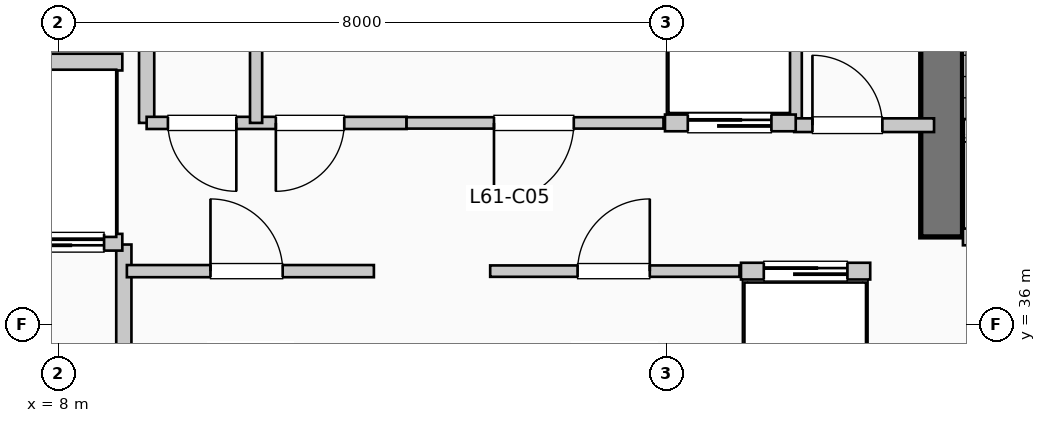
"""IFC4 building model, lengths in metres.
Left out: names, types, materials, properties, quantities, classifications, styles, units other than length and angle.
Written with IfcOpenShell. Run it as: python <this file> out.ifc"""

import sys

from ifc_helpers import new_model, si_unit, direction, frame, frame_2d, origin, place, context, subcontext, project, spatial, rectangle, extrude, element, fill, save


model = new_model("IFC4")
c1 = context("Model", 3, precision=1e-05, world=origin(), true_north=direction((0.0, 1.0)))
c2 = subcontext(c1, "Body", "Model", "MODEL_VIEW")
j1 = project(units=[si_unit("LENGTHUNIT", "METRE"), si_unit("PLANEANGLEUNIT", "RADIAN")], contexts=[c1])
p1 = place(None, origin())
s1 = spatial("IfcSite", under=j1, at=p1, CompositionType="ELEMENT")
p2 = place(p1, origin())
s2 = spatial("IfcBuilding", under=s1, at=p2, CompositionType="ELEMENT")
p3 = place(p2, frame((0.0, 0.0, 251.46)))
s3 = spatial("IfcBuildingStorey", under=s2, at=p3, CompositionType="ELEMENT", Elevation=251.46)
p4 = place(p3, frame((19.62, 37.15, 0.0), z_axis=(0.0, 0.0, 1.0), x_axis=(0.0, 1.0, 0.0)))
e1 = element("IfcWall", 1, at=p4, inside=s3, PredefinedType="SHEAR", context=c2, shape_type="SweptSolid", body=[
    extrude(rectangle(XDim=7.89, YDim=0.55, at=frame_2d((3.945, 0.0))), origin(), (0.0, 0.0, 1.0), 4.95),
])
p5 = place(p3, frame((8.86, 34.55, 0.0), z_axis=(0.0, 0.0, 1.0), x_axis=(0.0, 1.0, 0.0)))
e2 = element("IfcWall", 2, at=p5, inside=s3, PredefinedType="PARTITIONING", context=c2, shape_type="SweptSolid", body=[
    extrude(rectangle(XDim=2.5, YDim=0.2, at=frame_2d((1.25, 0.0))), origin(), (0.0, 0.0, 1.0), 4.7),
])
p6 = place(p3, frame((19.9, 37.15, 0.0), z_axis=(0.0, 0.0, 1.0), x_axis=(1.0, 0.0, 0.0)))
e3 = element("IfcWall", 3, at=p6, inside=s3, PredefinedType="PARTITIONING", context=c2, shape_type="SweptSolid", body=[
    extrude(rectangle(XDim=3.15, YDim=0.22, at=frame_2d((1.575, 0.0))), origin(), (0.0, 0.0, 1.0), 4.7),
])
p7 = place(p6, frame((2.05, 0.0, 0.0), z_axis=(0.0, 0.0, 1.0), x_axis=(-1.0, 0.0, 0.0)))
e4 = element("IfcOpeningElement", 4, at=p7, cuts=e3, PredefinedType="OPENING", context=c2, shape_type="SweptSolid", body=[
    extrude(rectangle(XDim=1.05, YDim=2.15, at=frame_2d((0.525, 1.075))), frame((0.0, 0.12, 0.0), z_axis=(0.0, -1.0, 0.0), x_axis=(1.0, 0.0, 0.0)), (0.0, 0.0, 1.0), 0.24),
])
p8 = place(p3, frame((5.38, 37.08, 0.0), z_axis=(0.0, 0.0, 1.0), x_axis=(1.0, 0.0, 0.0)))
e5 = element("IfcWall", 5, at=p8, inside=s3, PredefinedType="PARTITIONING", context=c2, shape_type="SweptSolid", body=[
    extrude(rectangle(XDim=3.46, YDim=0.22, at=frame_2d((1.73, 0.0))), origin(), (0.0, 0.0, 1.0), 4.7),
])
p9 = place(p8, frame((1.55, 0.0, 0.0), z_axis=(0.0, 0.0, 1.0), x_axis=(-1.0, 0.0, 0.0)))
e6 = element("IfcOpeningElement", 6, at=p9, cuts=e5, PredefinedType="OPENING", context=c2, shape_type="SweptSolid", body=[
    extrude(rectangle(XDim=1.2, YDim=2.2, at=frame_2d((0.6, 1.1))), frame((0.0, 0.12, 0.0), z_axis=(0.0, -1.0, 0.0), x_axis=(1.0, 0.0, 0.0)), (0.0, 0.0, 1.0), 0.24),
])
p10 = place(p8, frame((3.22, 0.0, 0.0), z_axis=(0.0, 0.0, 1.0), x_axis=(-1.0, 0.0, 0.0)))
e7 = element("IfcOpeningElement", 7, at=p10, cuts=e5, PredefinedType="OPENING", context=c2, shape_type="SweptSolid", body=[
    extrude(rectangle(XDim=1.2, YDim=2.2, at=frame_2d((0.6, 1.1))), frame((0.0, 0.12, 0.0), z_axis=(0.0, -1.0, 0.0), x_axis=(1.0, 0.0, 0.0)), (0.0, 0.0, 1.0), 0.24),
])
p11 = place(p3, frame((5.38, 39.45, 0.0), z_axis=(0.0, 0.0, 1.0), x_axis=(1.0, 0.0, 0.0)))
e8 = element("IfcWall", 8, at=p11, inside=s3, PredefinedType="PARTITIONING", context=c2, shape_type="SweptSolid", body=[
    extrude(rectangle(XDim=3.46, YDim=0.22, at=frame_2d((1.73, 0.0))), origin(), (0.0, 0.0, 1.0), 4.7),
])
for number, where, z_axis, x_axis in (
    (9, (9.16, 38.65, 0.0), (0.0, 0.0, 1.0), (0.0, 1.0, 0.0)),
    (10, (17.68, 38.65, 0.0), (0.0, 0.0, 1.0), (0.0, 1.0, 0.0)),
):
    element("IfcWall", number, at=place(p3, frame(where, z_axis=z_axis, x_axis=x_axis)), inside=s3, PredefinedType="PARTITIONING", context=c2, shape_type="SweptSolid", body=[
        extrude(rectangle(XDim=2.35, YDim=0.2, at=frame_2d((1.175, 0.0))), origin(), (0.0, 0.0, 1.0), 4.7),
    ])
p12 = place(p3, frame((17.68, 38.62, 0.0), z_axis=(0.0, 0.0, 1.0), x_axis=(1.0, 0.0, 0.0)))
e11 = element("IfcWall", 11, at=p12, inside=s3, PredefinedType="PARTITIONING", context=c2, shape_type="SweptSolid", body=[
    extrude(rectangle(XDim=1.84, YDim=0.18, at=frame_2d((0.92, 0.0))), origin(), (0.0, 0.0, 1.0), 4.7),
])
p13 = place(p12, frame((0.24, 0.0, 0.0)))
e12 = element("IfcOpeningElement", 12, at=p13, cuts=e11, PredefinedType="OPENING", context=c2, shape_type="SweptSolid", body=[
    extrude(rectangle(XDim=0.92, YDim=2.1, at=frame_2d((0.46, 1.05))), frame((0.0, 0.1, 0.0), z_axis=(0.0, -1.0, 0.0), x_axis=(1.0, 0.0, 0.0)), (0.0, 0.0, 1.0), 0.2),
])
p14 = place(p3, frame((8.9, 36.7, 0.0), z_axis=(0.0, 0.0, 1.0), x_axis=(1.0, 0.0, 0.0)))
e13 = element("IfcWall", 13, at=p14, inside=s3, PredefinedType="PARTITIONING", context=c2, shape_type="SweptSolid", body=[
    extrude(rectangle(XDim=3.25, YDim=0.16, at=frame_2d((1.625, 0.0))), origin(), (0.0, 0.0, 1.0), 4.7),
])
p15 = place(p14, frame((1.1, 0.0, 0.0)))
e14 = element("IfcOpeningElement", 14, at=p15, cuts=e13, PredefinedType="OPENING", context=c2, shape_type="SweptSolid", body=[
    extrude(rectangle(XDim=0.95, YDim=2.15, at=frame_2d((0.475, 1.075))), frame((0.0, 0.09, 0.0), z_axis=(0.0, -1.0, 0.0), x_axis=(1.0, 0.0, 0.0)), (0.0, 0.0, 1.0), 0.18),
])
p16 = place(p3, frame((9.16, 38.65, 0.0), z_axis=(0.0, 0.0, 1.0), x_axis=(1.0, 0.0, 0.0)))
e15 = element("IfcWall", 15, at=p16, inside=s3, PredefinedType="PARTITIONING", context=c2, shape_type="SweptSolid", body=[
    extrude(rectangle(XDim=3.42, YDim=0.16, at=frame_2d((1.71, 0.0))), origin(), (0.0, 0.0, 1.0), 4.7),
])
p17 = place(p16, frame((1.18, 0.0, 0.0), z_axis=(0.0, 0.0, 1.0), x_axis=(-1.0, 0.0, 0.0)))
e16 = element("IfcOpeningElement", 16, at=p17, cuts=e15, PredefinedType="OPENING", context=c2, shape_type="SweptSolid", body=[
    extrude(rectangle(XDim=0.9, YDim=2.15, at=frame_2d((0.45, 1.075))), frame((0.0, 0.09, 0.0), z_axis=(0.0, -1.0, 0.0), x_axis=(1.0, 0.0, 0.0)), (0.0, 0.0, 1.0), 0.18),
])
p18 = place(p16, frame((2.6, 0.0, 0.0), z_axis=(0.0, 0.0, 1.0), x_axis=(-1.0, 0.0, 0.0)))
e17 = element("IfcOpeningElement", 17, at=p18, cuts=e15, PredefinedType="OPENING", context=c2, shape_type="SweptSolid", body=[
    extrude(rectangle(XDim=0.9, YDim=2.15, at=frame_2d((0.45, 1.075))), frame((0.0, 0.09, 0.0), z_axis=(0.0, -1.0, 0.0), x_axis=(1.0, 0.0, 0.0)), (0.0, 0.0, 1.0), 0.18),
])
p19 = place(p3, frame((10.6, 38.65, 0.0), z_axis=(0.0, 0.0, 1.0), x_axis=(0.0, 1.0, 0.0)))
e18 = element("IfcWall", 18, at=p19, inside=s3, PredefinedType="PARTITIONING", context=c2, shape_type="SweptSolid", body=[
    extrude(rectangle(XDim=2.35, YDim=0.16, at=frame_2d((1.175, 0.0))), origin(), (0.0, 0.0, 1.0), 4.7),
])
p20 = place(p3, frame((13.68, 36.7, 0.0), z_axis=(0.0, 0.0, 1.0), x_axis=(1.0, 0.0, 0.0)))
e19 = element("IfcWall", 19, at=p20, inside=s3, PredefinedType="PARTITIONING", context=c2, shape_type="SweptSolid", body=[
    extrude(rectangle(XDim=3.28, YDim=0.15, at=frame_2d((1.64, 0.0))), origin(), (0.0, 0.0, 1.0), 4.7),
])
p21 = place(p20, frame((1.15, 0.0, 0.0)))
e20 = element("IfcOpeningElement", 20, at=p21, cuts=e19, PredefinedType="OPENING", context=c2, shape_type="SweptSolid", body=[
    extrude(rectangle(XDim=0.95, YDim=2.15, at=frame_2d((0.475, 1.075))), frame((0.0, 0.085, 0.0), z_axis=(0.0, -1.0, 0.0), x_axis=(1.0, 0.0, 0.0)), (0.0, 0.0, 1.0), 0.17),
])
p22 = place(p3, frame((12.58, 38.65, 0.0), z_axis=(0.0, 0.0, 1.0), x_axis=(1.0, 0.0, 0.0)))
e21 = element("IfcWall", 21, at=p22, inside=s3, PredefinedType="PARTITIONING", context=c2, shape_type="SweptSolid", body=[
    extrude(rectangle(XDim=3.38, YDim=0.15, at=frame_2d((1.69, 0.0))), origin(), (0.0, 0.0, 1.0), 4.7),
])
p23 = place(p22, frame((2.2, 0.0, 0.0), z_axis=(0.0, 0.0, 1.0), x_axis=(-1.0, 0.0, 0.0)))
e22 = element("IfcOpeningElement", 22, at=p23, cuts=e21, PredefinedType="OPENING", context=c2, shape_type="SweptSolid", body=[
    extrude(rectangle(XDim=1.05, YDim=2.15, at=frame_2d((0.525, 1.075))), frame((0.0, 0.085, 0.0), z_axis=(0.0, -1.0, 0.0), x_axis=(1.0, 0.0, 0.0)), (0.0, 0.0, 1.0), 0.17),
])
p24 = place(p3, frame((16.98, 36.7, 0.0), z_axis=(0.0, 0.0, 1.0), x_axis=(1.0, 0.0, 0.0)))
e23 = element("IfcWall", 23, at=p24, inside=s3, PredefinedType="PARTITIONING", context=c2, shape_type="SweptSolid", body=[
    extrude(rectangle(XDim=1.7, YDim=0.22, at=frame_2d((0.85, 0.0))), origin(), (0.0, 0.0, 1.0), 4.7),
])
p25 = place(p24, frame((0.3, 0.0, 0.0)))
e24 = element("IfcOpeningElement", 24, at=p25, cuts=e23, PredefinedType="OPENING", context=c2, shape_type="SweptSolid", body=[
    extrude(rectangle(XDim=1.1, YDim=2.2, at=frame_2d((0.55, 1.1))), frame((0.0, 0.12, 0.0), z_axis=(0.0, -1.0, 0.0), x_axis=(1.0, 0.0, 0.0)), (0.0, 0.0, 1.0), 0.24),
])
p26 = place(p3, frame((15.98, 38.65, 0.0), z_axis=(0.0, 0.0, 1.0), x_axis=(1.0, 0.0, 0.0)))
e25 = element("IfcWall", 25, at=p26, inside=s3, PredefinedType="PARTITIONING", context=c2, shape_type="SweptSolid", body=[
    extrude(rectangle(XDim=1.72, YDim=0.22, at=frame_2d((0.86, 0.0))), origin(), (0.0, 0.0, 1.0), 4.7),
])
p27 = place(p26, frame((0.3, 0.0, 0.0)))
e26 = element("IfcOpeningElement", 26, at=p27, cuts=e25, PredefinedType="OPENING", context=c2, shape_type="SweptSolid", body=[
    extrude(rectangle(XDim=1.1, YDim=2.2, at=frame_2d((0.55, 1.1))), frame((0.0, 0.12, 0.0), z_axis=(0.0, -1.0, 0.0), x_axis=(1.0, 0.0, 0.0)), (0.0, 0.0, 1.0), 0.24),
])
p28 = place(p10, origin())
e27 = element("IfcDoor", 27, at=p28, inside=s3, OperationType="SLIDING_TO_RIGHT", PredefinedType="DOOR", context=c2, shape_type="SweptSolid", body=[
    extrude(rectangle(XDim=1.2, YDim=2.2, at=frame_2d((0.6, 1.1))), frame((0.0, 0.025, 0.0), z_axis=(0.0, -1.0, 0.0), x_axis=(1.0, 0.0, 0.0)), (0.0, 0.0, 1.0), 0.05),
])
fill(e7, e27)
p29 = place(p13, origin())
e28 = element("IfcDoor", 28, at=p29, inside=s3, OperationType="SINGLE_SWING_LEFT", PredefinedType="DOOR", context=c2, shape_type="SweptSolid", body=[
    extrude(rectangle(XDim=0.92, YDim=2.1, at=frame_2d((0.46, 1.05))), frame((0.0, 0.025, 0.0), z_axis=(0.0, -1.0, 0.0), x_axis=(1.0, 0.0, 0.0)), (0.0, 0.0, 1.0), 0.05),
])
fill(e12, e28)
p30 = place(p15, origin())
e29 = element("IfcDoor", 29, at=p30, inside=s3, OperationType="SINGLE_SWING_LEFT", PredefinedType="DOOR", context=c2, shape_type="SweptSolid", body=[
    extrude(rectangle(XDim=0.95, YDim=2.15, at=frame_2d((0.475, 1.075))), frame((0.0, 0.025, 0.0), z_axis=(0.0, -1.0, 0.0), x_axis=(1.0, 0.0, 0.0)), (0.0, 0.0, 1.0), 0.05),
])
fill(e14, e29)
p31 = place(p17, origin())
e30 = element("IfcDoor", 30, at=p31, inside=s3, OperationType="SINGLE_SWING_RIGHT", PredefinedType="DOOR", context=c2, shape_type="SweptSolid", body=[
    extrude(rectangle(XDim=0.9, YDim=2.15, at=frame_2d((0.45, 1.075))), frame((0.0, 0.025, 0.0), z_axis=(0.0, -1.0, 0.0), x_axis=(1.0, 0.0, 0.0)), (0.0, 0.0, 1.0), 0.05),
])
fill(e16, e30)
p32 = place(p18, origin())
e31 = element("IfcDoor", 31, at=p32, inside=s3, OperationType="SINGLE_SWING_LEFT", PredefinedType="DOOR", context=c2, shape_type="SweptSolid", body=[
    extrude(rectangle(XDim=0.9, YDim=2.15, at=frame_2d((0.45, 1.075))), frame((0.0, 0.025, 0.0), z_axis=(0.0, -1.0, 0.0), x_axis=(1.0, 0.0, 0.0)), (0.0, 0.0, 1.0), 0.05),
])
fill(e17, e31)
p33 = place(p21, origin())
e32 = element("IfcDoor", 32, at=p33, inside=s3, OperationType="SINGLE_SWING_RIGHT", PredefinedType="DOOR", context=c2, shape_type="SweptSolid", body=[
    extrude(rectangle(XDim=0.95, YDim=2.15, at=frame_2d((0.475, 1.075))), frame((0.0, 0.025, 0.0), z_axis=(0.0, -1.0, 0.0), x_axis=(1.0, 0.0, 0.0)), (0.0, 0.0, 1.0), 0.05),
])
fill(e20, e32)
p34 = place(p23, origin())
e33 = element("IfcDoor", 33, at=p34, inside=s3, OperationType="SINGLE_SWING_LEFT", PredefinedType="DOOR", context=c2, shape_type="SweptSolid", body=[
    extrude(rectangle(XDim=1.05, YDim=2.15, at=frame_2d((0.525, 1.075))), frame((0.0, 0.025, 0.0), z_axis=(0.0, -1.0, 0.0), x_axis=(1.0, 0.0, 0.0)), (0.0, 0.0, 1.0), 0.05),
])
fill(e22, e33)
p35 = place(p25, origin())
e34 = element("IfcDoor", 34, at=p35, inside=s3, OperationType="SLIDING_TO_LEFT", PredefinedType="DOOR", context=c2, shape_type="SweptSolid", body=[
    extrude(rectangle(XDim=1.1, YDim=2.2, at=frame_2d((0.55, 1.1))), frame((0.0, 0.025, 0.0), z_axis=(0.0, -1.0, 0.0), x_axis=(1.0, 0.0, 0.0)), (0.0, 0.0, 1.0), 0.05),
])
fill(e24, e34)
p36 = place(p27, origin())
e35 = element("IfcDoor", 35, at=p36, inside=s3, OperationType="SLIDING_TO_LEFT", PredefinedType="DOOR", context=c2, shape_type="SweptSolid", body=[
    extrude(rectangle(XDim=1.1, YDim=2.2, at=frame_2d((0.55, 1.1))), frame((0.0, 0.025, 0.0), z_axis=(0.0, -1.0, 0.0), x_axis=(1.0, 0.0, 0.0)), (0.0, 0.0, 1.0), 0.05),
])
fill(e26, e35)
save(model, sys.argv[1])
